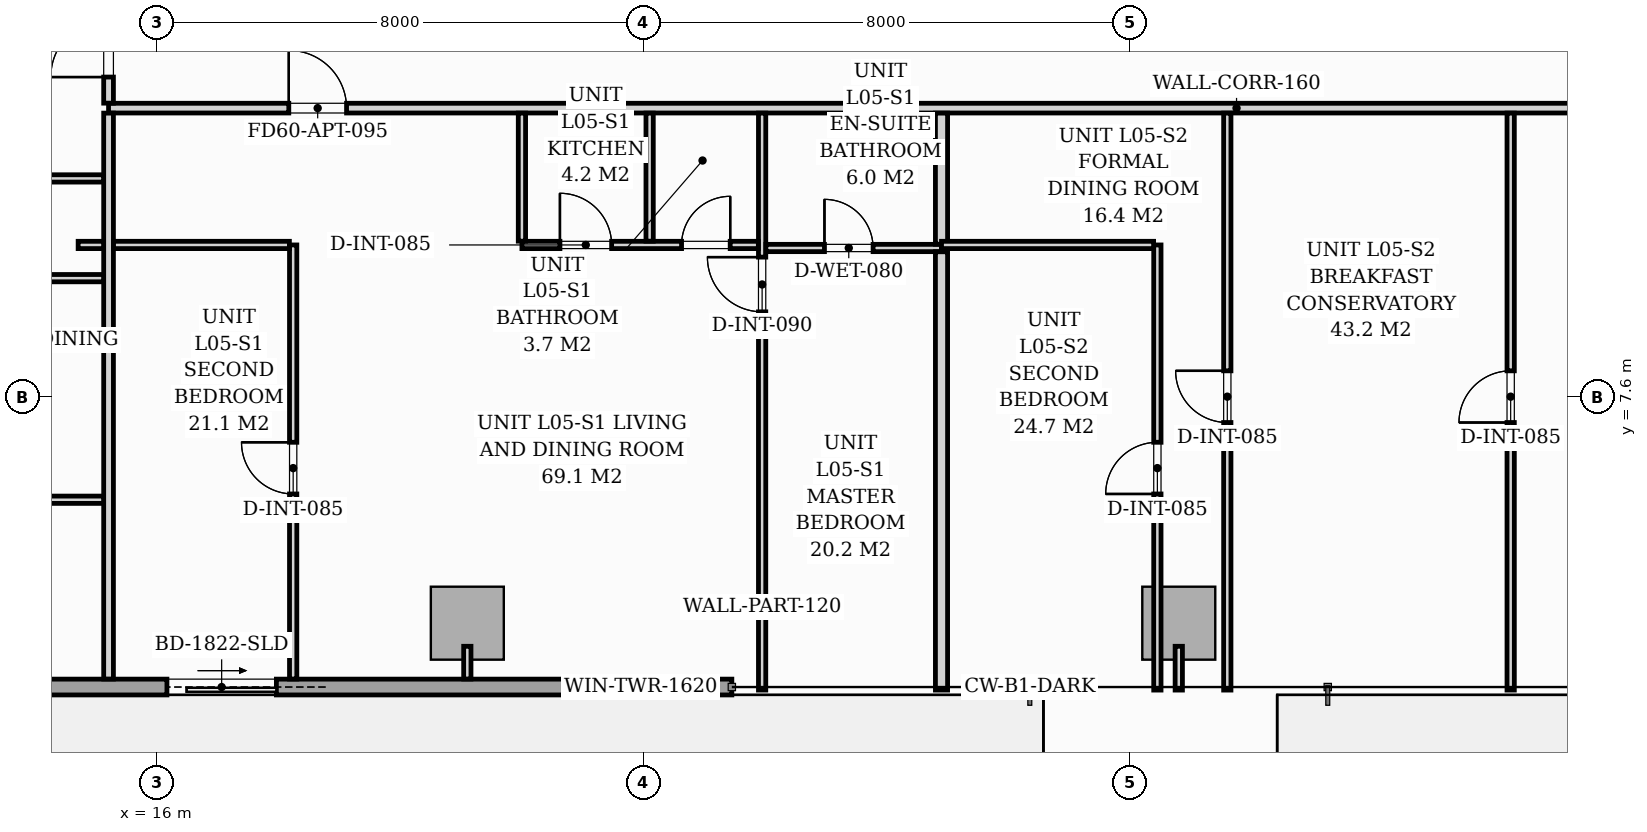
"""IFC4 building model, lengths in metres.
Left out: names, types, materials, properties, quantities, classifications, styles, units other than length and angle.
Written with IfcOpenShell. Run it as: python <this file> out.ifc"""

import sys

from ifc_helpers import new_model, si_unit, direction, frame, frame_2d, origin, origin_2d, place, context, subcontext, project, spatial, rectangle, extrude, source, transform, mapped, element, fill, save


model = new_model("IFC4")
c1 = context("Model", 3, precision=1e-05, world=origin(), true_north=direction((0.0, 1.0)))
c2 = subcontext(c1, "Body", "Model", "MODEL_VIEW")
j1 = project(units=[si_unit("LENGTHUNIT", "METRE"), si_unit("PLANEANGLEUNIT", "RADIAN")], contexts=[c1])
p1 = place(None, origin())
s1 = spatial("IfcSite", under=j1, at=p1, CompositionType="ELEMENT")
p2 = place(p1, origin())
s2 = spatial("IfcBuilding", under=s1, at=p2, CompositionType="ELEMENT")
p3 = place(p2, frame((0.0, 0.0, 23.0)))
s3 = spatial("IfcBuildingStorey", under=s2, at=p3, CompositionType="ELEMENT", Elevation=23.0)
m1 = source(origin(), c2, "Body", "SweptSolid", [
    extrude(rectangle(XDim=1.2, YDim=1.2, at=origin_2d()), origin(), (0.0, 0.0, 1.0), 3.194),
])
for number, where, z_axis, x_axis in (
    (1, (21.1, 3.88, 0.004), (0.0, 0.0, 1.0), (1.0, 0.0, 0.0)),
    (2, (32.8, 3.88, 0.004), (0.0, 0.0, 1.0), (1.0, 0.0, 0.0)),
):
    element("IfcColumn", number, at=place(p3, frame(where, z_axis=z_axis, x_axis=x_axis)), inside=s3, PredefinedType="COLUMN", context=c2, shape_type="MappedRepresentation", body=[
        mapped(m1, transform((0.0, 0.0, 0.0), scale=1.0)),
    ])
p4 = place(p3, frame((25.45, 2.83, 0.0), z_axis=(0.0, 0.0, 1.0), x_axis=(-1.0, 0.0, 0.0)))
e3 = element("IfcWall", 3, at=p4, inside=s3, PredefinedType="STANDARD", context=c2, shape_type="SweptSolid", body=[
    extrude(rectangle(XDim=17.15, YDim=0.26, at=frame_2d((8.575, 0.0))), origin(), (0.0, 0.0, 1.0), 2.94),
])
p5 = place(p4, frame((7.49, 0.0, 0.0)))
e4 = element("IfcOpeningElement", 4, at=p5, cuts=e3, PredefinedType="OPENING", context=c2, shape_type="SweptSolid", body=[
    extrude(rectangle(XDim=1.8, YDim=2.06, at=frame_2d((0.9, 1.03))), frame((0.0, 0.14, 0.0), z_axis=(0.0, -1.0, 0.0), x_axis=(1.0, 0.0, 0.0)), (0.0, 0.0, 1.0), 0.28),
])
p6 = place(p4, frame((0.7, 0.0, 0.65)))
e5 = element("IfcOpeningElement", 5, at=p6, cuts=e3, PredefinedType="OPENING", context=c2, shape_type="SweptSolid", body=[
    extrude(rectangle(XDim=1.6, YDim=1.5, at=frame_2d((0.8, 0.75))), frame((0.0, 0.14, 0.0), z_axis=(0.0, -1.0, 0.0), x_axis=(1.0, 0.0, 0.0)), (0.0, 0.0, 1.0), 0.28),
])
p7 = place(p4, frame((12.84, 0.0, 0.75)))
e6 = element("IfcOpeningElement", 6, at=p7, cuts=e3, PredefinedType="OPENING", context=c2, shape_type="SweptSolid", body=[
    extrude(rectangle(XDim=1.6, YDim=1.5, at=frame_2d((0.8, 0.75))), frame((0.0, 0.14, 0.0), z_axis=(0.0, -1.0, 0.0), x_axis=(1.0, 0.0, 0.0)), (0.0, 0.0, 1.0), 0.28),
])
p8 = place(p3, frame((15.2, 12.35, 0.0), z_axis=(0.0, 0.0, 1.0), x_axis=(1.0, 0.0, 0.0)))
e7 = element("IfcWall", 7, at=p8, inside=s3, PredefinedType="PARTITIONING", context=c2, shape_type="SweptSolid", body=[
    extrude(rectangle(XDim=37.1, YDim=0.16, at=frame_2d((18.55, 0.0))), origin(), (0.0, 0.0, 1.0), 2.94),
])
p9 = place(p8, frame((2.964, 0.0, 0.0)))
e8 = element("IfcOpeningElement", 8, at=p9, cuts=e7, PredefinedType="OPENING", context=c2, shape_type="SweptSolid", body=[
    extrude(rectangle(XDim=0.95, YDim=2.06, at=frame_2d((0.475, 1.03))), frame((0.0, 0.09, 0.0), z_axis=(0.0, -1.0, 0.0), x_axis=(1.0, 0.0, 0.0)), (0.0, 0.0, 1.0), 0.18),
])
p10 = place(p8, frame((28.202, 0.0, 0.0)))
e9 = element("IfcOpeningElement", 9, at=p10, cuts=e7, PredefinedType="OPENING", context=c2, shape_type="SweptSolid", body=[
    extrude(rectangle(XDim=0.95, YDim=2.06, at=frame_2d((0.475, 1.03))), frame((0.0, 0.09, 0.0), z_axis=(0.0, -1.0, 0.0), x_axis=(1.0, 0.0, 0.0)), (0.0, 0.0, 1.0), 0.18),
])
p11 = place(p3, frame((15.2, 2.962, 0.0), z_axis=(0.0, 0.0, 1.0), x_axis=(0.0, 1.0, 0.0)))
e10 = element("IfcWall", 10, at=p11, inside=s3, PredefinedType="PARTITIONING", context=c2, shape_type="SweptSolid", body=[
    extrude(rectangle(XDim=9.306, YDim=0.16, at=frame_2d((4.653, 0.0))), origin(), (0.0, 0.0, 1.0), 2.94),
])
p12 = place(p3, frame((15.2, 12.432, 0.0), z_axis=(0.0, 0.0, 1.0), x_axis=(0.0, 1.0, 0.0)))
e11 = element("IfcWall", 11, at=p12, inside=s3, PredefinedType="PARTITIONING", context=c2, shape_type="SweptSolid", body=[
    extrude(rectangle(XDim=15.006, YDim=0.16, at=frame_2d((7.503, 0.0))), origin(), (0.0, 0.0, 1.0), 2.94),
])
p13 = place(p12, frame((0.429, 0.0, 0.0)))
e12 = element("IfcOpeningElement", 12, at=p13, cuts=e11, PredefinedType="OPENING", context=c2, shape_type="SweptSolid", body=[
    extrude(rectangle(XDim=0.95, YDim=2.06, at=frame_2d((0.475, 1.03))), frame((0.0, 0.09, 0.0), z_axis=(0.0, -1.0, 0.0), x_axis=(1.0, 0.0, 0.0)), (0.0, 0.0, 1.0), 0.18),
])
p14 = place(p3, frame((25.948, 2.78, 0.0), z_axis=(0.0, 0.0, 1.0), x_axis=(0.0, 1.0, 0.0)))
e13 = element("IfcWall", 13, at=p14, inside=s3, PredefinedType="PARTITIONING", context=c2, shape_type="SweptSolid", body=[
    extrude(rectangle(XDim=9.488, YDim=0.12, at=frame_2d((4.744, 0.0))), origin(), (0.0, 0.0, 1.0), 2.94),
])
p15 = place(p14, frame((6.22, 0.0, 0.0)))
e14 = element("IfcOpeningElement", 14, at=p15, cuts=e13, PredefinedType="OPENING", context=c2, shape_type="SweptSolid", body=[
    extrude(rectangle(XDim=0.9, YDim=2.05, at=frame_2d((0.45, 1.025))), frame((0.0, 0.07, 0.0), z_axis=(0.0, -1.0, 0.0), x_axis=(1.0, 0.0, 0.0)), (0.0, 0.0, 1.0), 0.14),
])
p16 = place(p3, frame((21.998, 10.1, 0.0), z_axis=(0.0, 0.0, 1.0), x_axis=(1.0, 0.0, 0.0)))
e15 = element("IfcWall", 15, at=p16, inside=s3, PredefinedType="PARTITIONING", context=c2, shape_type="SweptSolid", body=[
    extrude(rectangle(XDim=3.888, YDim=0.12, at=frame_2d((1.944, 0.0))), origin(), (0.0, 0.0, 1.0), 2.94),
])
p17 = place(p16, frame((0.625, 0.0, 0.0)))
e16 = element("IfcOpeningElement", 16, at=p17, cuts=e15, PredefinedType="OPENING", context=c2, shape_type="SweptSolid", body=[
    extrude(rectangle(XDim=0.85, YDim=2.05, at=frame_2d((0.425, 1.025))), frame((0.0, 0.07, 0.0), z_axis=(0.0, -1.0, 0.0), x_axis=(1.0, 0.0, 0.0)), (0.0, 0.0, 1.0), 0.14),
])
p18 = place(p16, frame((2.625, 0.0, 0.0)))
e17 = element("IfcOpeningElement", 17, at=p18, cuts=e15, PredefinedType="OPENING", context=c2, shape_type="SweptSolid", body=[
    extrude(rectangle(XDim=0.8, YDim=2.02, at=frame_2d((0.4, 1.01))), frame((0.0, 0.07, 0.0), z_axis=(0.0, -1.0, 0.0), x_axis=(1.0, 0.0, 0.0)), (0.0, 0.0, 1.0), 0.14),
])
for number, where, z_axis, x_axis in (
    (18, (24.098, 10.162, 0.0), (0.0, 0.0, 1.0), (0.0, 1.0, 0.0)),
    (19, (21.998, 10.162, 0.0), (0.0, 0.0, 1.0), (0.0, 1.0, 0.0)),
):
    element("IfcWall", number, at=place(p3, frame(where, z_axis=z_axis, x_axis=x_axis)), inside=s3, PredefinedType="PARTITIONING", context=c2, shape_type="SweptSolid", body=[
        extrude(rectangle(XDim=2.106, YDim=0.12, at=frame_2d((1.053, 0.0))), origin(), (0.0, 0.0, 1.0), 2.94),
    ])
p19 = place(p3, frame((26.01, 10.05, 0.0), z_axis=(0.0, 0.0, 1.0), x_axis=(1.0, 0.0, 0.0)))
e20 = element("IfcWall", 20, at=p19, inside=s3, PredefinedType="PARTITIONING", context=c2, shape_type="SweptSolid", body=[
    extrude(rectangle(XDim=2.888, YDim=0.12, at=frame_2d((1.444, 0.0))), origin(), (0.0, 0.0, 1.0), 2.94),
])
p20 = place(p19, frame((0.963, 0.0, 0.0)))
e21 = element("IfcOpeningElement", 21, at=p20, cuts=e20, PredefinedType="OPENING", context=c2, shape_type="SweptSolid", body=[
    extrude(rectangle(XDim=0.8, YDim=2.02, at=frame_2d((0.4, 1.01))), frame((0.0, 0.07, 0.0), z_axis=(0.0, -1.0, 0.0), x_axis=(1.0, 0.0, 0.0)), (0.0, 0.0, 1.0), 0.14),
])
p21 = place(p3, frame((18.236, 2.962, 0.0), z_axis=(0.0, 0.0, 1.0), x_axis=(0.0, 1.0, 0.0)))
e22 = element("IfcWall", 22, at=p21, inside=s3, PredefinedType="PARTITIONING", context=c2, shape_type="SweptSolid", body=[
    extrude(rectangle(XDim=7.138, YDim=0.12, at=frame_2d((3.569, 0.0))), origin(), (0.0, 0.0, 1.0), 2.94),
])
p22 = place(p21, frame((3.043, 0.0, 0.0)))
e23 = element("IfcOpeningElement", 23, at=p22, cuts=e22, PredefinedType="OPENING", context=c2, shape_type="SweptSolid", body=[
    extrude(rectangle(XDim=0.85, YDim=2.05, at=frame_2d((0.425, 1.025))), frame((0.0, 0.07, 0.0), z_axis=(0.0, -1.0, 0.0), x_axis=(1.0, 0.0, 0.0)), (0.0, 0.0, 1.0), 0.14),
])
p23 = place(p3, frame((14.7, 10.1, 0.0), z_axis=(0.0, 0.0, 1.0), x_axis=(1.0, 0.0, 0.0)))
e24 = element("IfcWall", 24, at=p23, inside=s3, PredefinedType="PARTITIONING", context=c2, shape_type="SweptSolid", body=[
    extrude(rectangle(XDim=0.418, YDim=0.12, at=frame_2d((0.209, 0.0))), origin(), (0.0, 0.0, 1.0), 2.94),
])
p24 = place(p3, frame((15.282, 10.1, 0.0), z_axis=(0.0, 0.0, 1.0), x_axis=(1.0, 0.0, 0.0)))
e25 = element("IfcWall", 25, at=p24, inside=s3, PredefinedType="PARTITIONING", context=c2, shape_type="SweptSolid", body=[
    extrude(rectangle(XDim=2.892, YDim=0.12, at=frame_2d((1.446, 0.0))), origin(), (0.0, 0.0, 1.0), 2.94),
])
p25 = place(p3, frame((28.898, 2.78, 0.0), z_axis=(0.0, 0.0, 1.0), x_axis=(0.0, 1.0, 0.0)))
e26 = element("IfcWall", 26, at=p25, inside=s3, PredefinedType="PARTITIONING", context=c2, shape_type="SweptSolid", body=[
    extrude(rectangle(XDim=7.208, YDim=0.2, at=frame_2d((3.604, 0.0))), origin(), (0.0, 0.0, 1.0), 2.94),
])
p26 = place(p3, frame((28.898, 10.112, 0.0), z_axis=(0.0, 0.0, 1.0), x_axis=(0.0, 1.0, 0.0)))
e27 = element("IfcWall", 27, at=p26, inside=s3, PredefinedType="PARTITIONING", context=c2, shape_type="SweptSolid", body=[
    extrude(rectangle(XDim=2.156, YDim=0.2, at=frame_2d((1.078, 0.0))), origin(), (0.0, 0.0, 1.0), 2.94),
])
p27 = place(p3, frame((32.448, 2.78, 0.0), z_axis=(0.0, 0.0, 1.0), x_axis=(0.0, 1.0, 0.0)))
e28 = element("IfcWall", 28, at=p27, inside=s3, PredefinedType="PARTITIONING", context=c2, shape_type="SweptSolid", body=[
    extrude(rectangle(XDim=7.32, YDim=0.12, at=frame_2d((3.66, 0.0))), origin(), (0.0, 0.0, 1.0), 2.94),
])
p28 = place(p27, frame((3.225, 0.0, 0.0)))
e29 = element("IfcOpeningElement", 29, at=p28, cuts=e28, PredefinedType="OPENING", context=c2, shape_type="SweptSolid", body=[
    extrude(rectangle(XDim=0.85, YDim=2.05, at=frame_2d((0.425, 1.025))), frame((0.0, 0.07, 0.0), z_axis=(0.0, -1.0, 0.0), x_axis=(1.0, 0.0, 0.0)), (0.0, 0.0, 1.0), 0.14),
])
p29 = place(p3, frame((28.898, 10.1, 0.0), z_axis=(0.0, 0.0, 1.0), x_axis=(1.0, 0.0, 0.0)))
e30 = element("IfcWall", 30, at=p29, inside=s3, PredefinedType="PARTITIONING", context=c2, shape_type="SweptSolid", body=[
    extrude(rectangle(XDim=3.488, YDim=0.12, at=frame_2d((1.744, 0.0))), origin(), (0.0, 0.0, 1.0), 2.94),
])
p30 = place(p3, frame((33.598, 2.78, 0.0), z_axis=(0.0, 0.0, 1.0), x_axis=(0.0, 1.0, 0.0)))
e31 = element("IfcWall", 31, at=p30, inside=s3, PredefinedType="PARTITIONING", context=c2, shape_type="SweptSolid", body=[
    extrude(rectangle(XDim=9.488, YDim=0.12, at=frame_2d((4.744, 0.0))), origin(), (0.0, 0.0, 1.0), 2.94),
])
p31 = place(p30, frame((4.4, 0.0, 0.0)))
e32 = element("IfcOpeningElement", 32, at=p31, cuts=e31, PredefinedType="OPENING", context=c2, shape_type="SweptSolid", body=[
    extrude(rectangle(XDim=0.85, YDim=2.05, at=frame_2d((0.425, 1.025))), frame((0.0, 0.07, 0.0), z_axis=(0.0, -1.0, 0.0), x_axis=(1.0, 0.0, 0.0)), (0.0, 0.0, 1.0), 0.14),
])
p32 = place(p3, frame((38.258, 2.78, 0.0), z_axis=(0.0, 0.0, 1.0), x_axis=(0.0, 1.0, 0.0)))
e33 = element("IfcWall", 33, at=p32, inside=s3, PredefinedType="PARTITIONING", context=c2, shape_type="SweptSolid", body=[
    extrude(rectangle(XDim=9.488, YDim=0.12, at=frame_2d((4.744, 0.0))), origin(), (0.0, 0.0, 1.0), 2.94),
])
p33 = place(p32, frame((4.4, 0.0, 0.0)))
e34 = element("IfcOpeningElement", 34, at=p33, cuts=e33, PredefinedType="OPENING", context=c2, shape_type="SweptSolid", body=[
    extrude(rectangle(XDim=0.85, YDim=2.05, at=frame_2d((0.425, 1.025))), frame((0.0, 0.07, 0.0), z_axis=(0.0, -1.0, 0.0), x_axis=(1.0, 0.0, 0.0)), (0.0, 0.0, 1.0), 0.14),
])
p34 = place(p3, frame((5.88, 5.91, 0.0), z_axis=(0.0, 0.0, 1.0), x_axis=(1.0, 0.0, 0.0)))
e35 = element("IfcWall", 35, at=p34, inside=s3, PredefinedType="PARTITIONING", context=c2, shape_type="SweptSolid", body=[
    extrude(rectangle(XDim=9.238, YDim=0.12, at=frame_2d((4.619, 0.0))), origin(), (0.0, 0.0, 1.0), 2.94),
])
p35 = place(p34, frame((4.185, 0.0, 0.0)))
e36 = element("IfcOpeningElement", 36, at=p35, cuts=e35, PredefinedType="OPENING", context=c2, shape_type="SweptSolid", body=[
    extrude(rectangle(XDim=0.85, YDim=2.05, at=frame_2d((0.425, 1.025))), frame((0.0, 0.07, 0.0), z_axis=(0.0, -1.0, 0.0), x_axis=(1.0, 0.0, 0.0)), (0.0, 0.0, 1.0), 0.14),
])
p36 = place(p3, frame((5.88, 9.554, 0.0), z_axis=(0.0, 0.0, 1.0), x_axis=(1.0, 0.0, 0.0)))
e37 = element("IfcWall", 37, at=p36, inside=s3, PredefinedType="PARTITIONING", context=c2, shape_type="SweptSolid", body=[
    extrude(rectangle(XDim=9.238, YDim=0.12, at=frame_2d((4.619, 0.0))), origin(), (0.0, 0.0, 1.0), 2.94),
])
p37 = place(p36, frame((4.185, 0.0, 0.0)))
e38 = element("IfcOpeningElement", 38, at=p37, cuts=e37, PredefinedType="OPENING", context=c2, shape_type="SweptSolid", body=[
    extrude(rectangle(XDim=0.85, YDim=2.05, at=frame_2d((0.425, 1.025))), frame((0.0, 0.07, 0.0), z_axis=(0.0, -1.0, 0.0), x_axis=(1.0, 0.0, 0.0)), (0.0, 0.0, 1.0), 0.14),
])
p38 = place(p3, frame((5.88, 11.194, 0.0), z_axis=(0.0, 0.0, 1.0), x_axis=(1.0, 0.0, 0.0)))
e39 = element("IfcWall", 39, at=p38, inside=s3, PredefinedType="PARTITIONING", context=c2, shape_type="SweptSolid", body=[
    extrude(rectangle(XDim=9.238, YDim=0.12, at=frame_2d((4.619, 0.0))), origin(), (0.0, 0.0, 1.0), 2.94),
])
p39 = place(p38, frame((4.185, 0.0, 0.0)))
e40 = element("IfcOpeningElement", 40, at=p39, cuts=e39, PredefinedType="OPENING", context=c2, shape_type="SweptSolid", body=[
    extrude(rectangle(XDim=0.85, YDim=2.05, at=frame_2d((0.425, 1.025))), frame((0.0, 0.07, 0.0), z_axis=(0.0, -1.0, 0.0), x_axis=(1.0, 0.0, 0.0)), (0.0, 0.0, 1.0), 0.14),
])
p40 = place(p3, frame((21.1, 3.5, 0.0), z_axis=(0.0, 0.0, 1.0), x_axis=(0.0, -1.0, 0.0)))
e41 = element("IfcWall", 41, at=p40, inside=s3, PredefinedType="PARTITIONING", context=c2, shape_type="SweptSolid", body=[
    extrude(rectangle(XDim=0.538, YDim=0.12, at=frame_2d((0.269, 0.0))), origin(), (0.0, 0.0, 1.0), 2.94),
])
p41 = place(p3, frame((32.8, 3.5, 0.0), z_axis=(0.0, 0.0, 1.0), x_axis=(0.0, -1.0, 0.0)))
e42 = element("IfcWall", 42, at=p41, inside=s3, PredefinedType="PARTITIONING", context=c2, shape_type="SweptSolid", body=[
    extrude(rectangle(XDim=0.72, YDim=0.12, at=frame_2d((0.36, 0.0))), origin(), (0.0, 0.0, 1.0), 2.94),
])
m2 = source(origin(), c2, "Body", "SweptSolid", [
    extrude(rectangle(XDim=1.8, YDim=2.06, at=frame_2d((0.9, 1.03))), frame((0.0, 0.025, 0.0), z_axis=(0.0, -1.0, 0.0), x_axis=(1.0, 0.0, 0.0)), (0.0, 0.0, 1.0), 0.05),
])
p42 = place(p5, origin())
e43 = element("IfcDoor", 43, at=p42, inside=s3, OperationType="SLIDING_TO_LEFT", PredefinedType="DOOR", context=c2, shape_type="MappedRepresentation", body=[
    mapped(m2, transform((0.0, 0.0, 0.0), scale=1.0)),
])
fill(e4, e43)
m3 = source(origin(), c2, "Body", "SweptSolid", [
    extrude(rectangle(XDim=1.6, YDim=1.5, at=frame_2d((0.8, 0.75))), frame((0.0, 0.03, 0.0), z_axis=(0.0, -1.0, 0.0), x_axis=(1.0, 0.0, 0.0)), (0.0, 0.0, 1.0), 0.06),
])
p43 = place(p6, origin())
e44 = element("IfcWindow", 44, at=p43, inside=s3, PartitioningType="SINGLE_PANEL", PredefinedType="WINDOW", context=c2, shape_type="MappedRepresentation", body=[
    mapped(m3, transform((0.0, 0.0, 0.0), scale=1.0)),
])
fill(e5, e44)
m4 = source(origin(), c2, "Body", "SweptSolid", [
    extrude(rectangle(XDim=0.8, YDim=2.02, at=frame_2d((0.4, 1.01))), frame((0.0, 0.025, 0.0), z_axis=(0.0, -1.0, 0.0), x_axis=(1.0, 0.0, 0.0)), (0.0, 0.0, 1.0), 0.05),
])
p44 = place(p20, origin())
e45 = element("IfcDoor", 45, at=p44, inside=s3, OperationType="SINGLE_SWING_LEFT", PredefinedType="DOOR", context=c2, shape_type="MappedRepresentation", body=[
    mapped(m4, transform((0.0, 0.0, 0.0), scale=1.0)),
])
fill(e21, e45)
m5 = source(origin(), c2, "Body", "SweptSolid", [
    extrude(rectangle(XDim=0.85, YDim=2.05, at=frame_2d((0.425, 1.025))), frame((0.0, 0.025, 0.0), z_axis=(0.0, -1.0, 0.0), x_axis=(1.0, 0.0, 0.0)), (0.0, 0.0, 1.0), 0.05),
])
p45 = place(p22, origin())
e46 = element("IfcDoor", 46, at=p45, inside=s3, OperationType="SINGLE_SWING_RIGHT", PredefinedType="DOOR", context=c2, shape_type="MappedRepresentation", body=[
    mapped(m5, transform((0.0, 0.0, 0.0), scale=1.0)),
])
fill(e23, e46)
m6 = source(origin(), c2, "Body", "SweptSolid", [
    extrude(rectangle(XDim=0.95, YDim=2.06, at=frame_2d((0.475, 1.03))), frame((0.0, 0.025, 0.0), z_axis=(0.0, -1.0, 0.0), x_axis=(1.0, 0.0, 0.0)), (0.0, 0.0, 1.0), 0.05),
])
p46 = place(p9, origin())
e47 = element("IfcDoor", 47, at=p46, inside=s3, OperationType="SINGLE_SWING_LEFT", PredefinedType="DOOR", context=c2, shape_type="MappedRepresentation", body=[
    mapped(m6, transform((0.0, 0.0, 0.0), scale=1.0)),
])
fill(e8, e47)
m7 = source(origin(), c2, "Body", "SweptSolid", [
    extrude(rectangle(XDim=0.9, YDim=2.05, at=frame_2d((0.45, 1.025))), frame((0.0, 0.025, 0.0), z_axis=(0.0, -1.0, 0.0), x_axis=(1.0, 0.0, 0.0)), (0.0, 0.0, 1.0), 0.05),
])
p47 = place(p15, origin())
e48 = element("IfcDoor", 48, at=p47, inside=s3, OperationType="SINGLE_SWING_RIGHT", PredefinedType="DOOR", context=c2, shape_type="MappedRepresentation", body=[
    mapped(m7, transform((0.0, 0.0, 0.0), scale=1.0)),
])
fill(e14, e48)
p48 = place(p17, origin())
e49 = element("IfcDoor", 49, at=p48, inside=s3, OperationType="SINGLE_SWING_LEFT", PredefinedType="DOOR", context=c2, shape_type="MappedRepresentation", body=[
    mapped(m5, transform((0.0, 0.0, 0.0), scale=1.0)),
])
fill(e16, e49)
p49 = place(p18, origin())
e50 = element("IfcDoor", 50, at=p49, inside=s3, OperationType="SINGLE_SWING_RIGHT", PredefinedType="DOOR", context=c2, shape_type="MappedRepresentation", body=[
    mapped(m4, transform((0.0, 0.0, 0.0), scale=1.0)),
])
fill(e17, e50)
p50 = place(p28, origin())
e51 = element("IfcDoor", 51, at=p50, inside=s3, OperationType="SINGLE_SWING_LEFT", PredefinedType="DOOR", context=c2, shape_type="MappedRepresentation", body=[
    mapped(m5, transform((0.0, 0.0, 0.0), scale=1.0)),
])
fill(e29, e51)
p51 = place(p31, origin())
e52 = element("IfcDoor", 52, at=p51, inside=s3, OperationType="SINGLE_SWING_RIGHT", PredefinedType="DOOR", context=c2, shape_type="MappedRepresentation", body=[
    mapped(m5, transform((0.0, 0.0, 0.0), scale=1.0)),
])
fill(e32, e52)
p52 = place(p33, origin())
e53 = element("IfcDoor", 53, at=p52, inside=s3, OperationType="SINGLE_SWING_LEFT", PredefinedType="DOOR", context=c2, shape_type="MappedRepresentation", body=[
    mapped(m5, transform((0.0, 0.0, 0.0), scale=1.0)),
])
fill(e34, e53)
p53 = place(p13, origin())
e54 = element("IfcDoor", 54, at=p53, inside=s3, OperationType="SINGLE_SWING_LEFT", PredefinedType="DOOR", context=c2, shape_type="MappedRepresentation", body=[
    mapped(m6, transform((0.0, 0.0, 0.0), scale=1.0)),
])
fill(e12, e54)
save(model, sys.argv[1])
